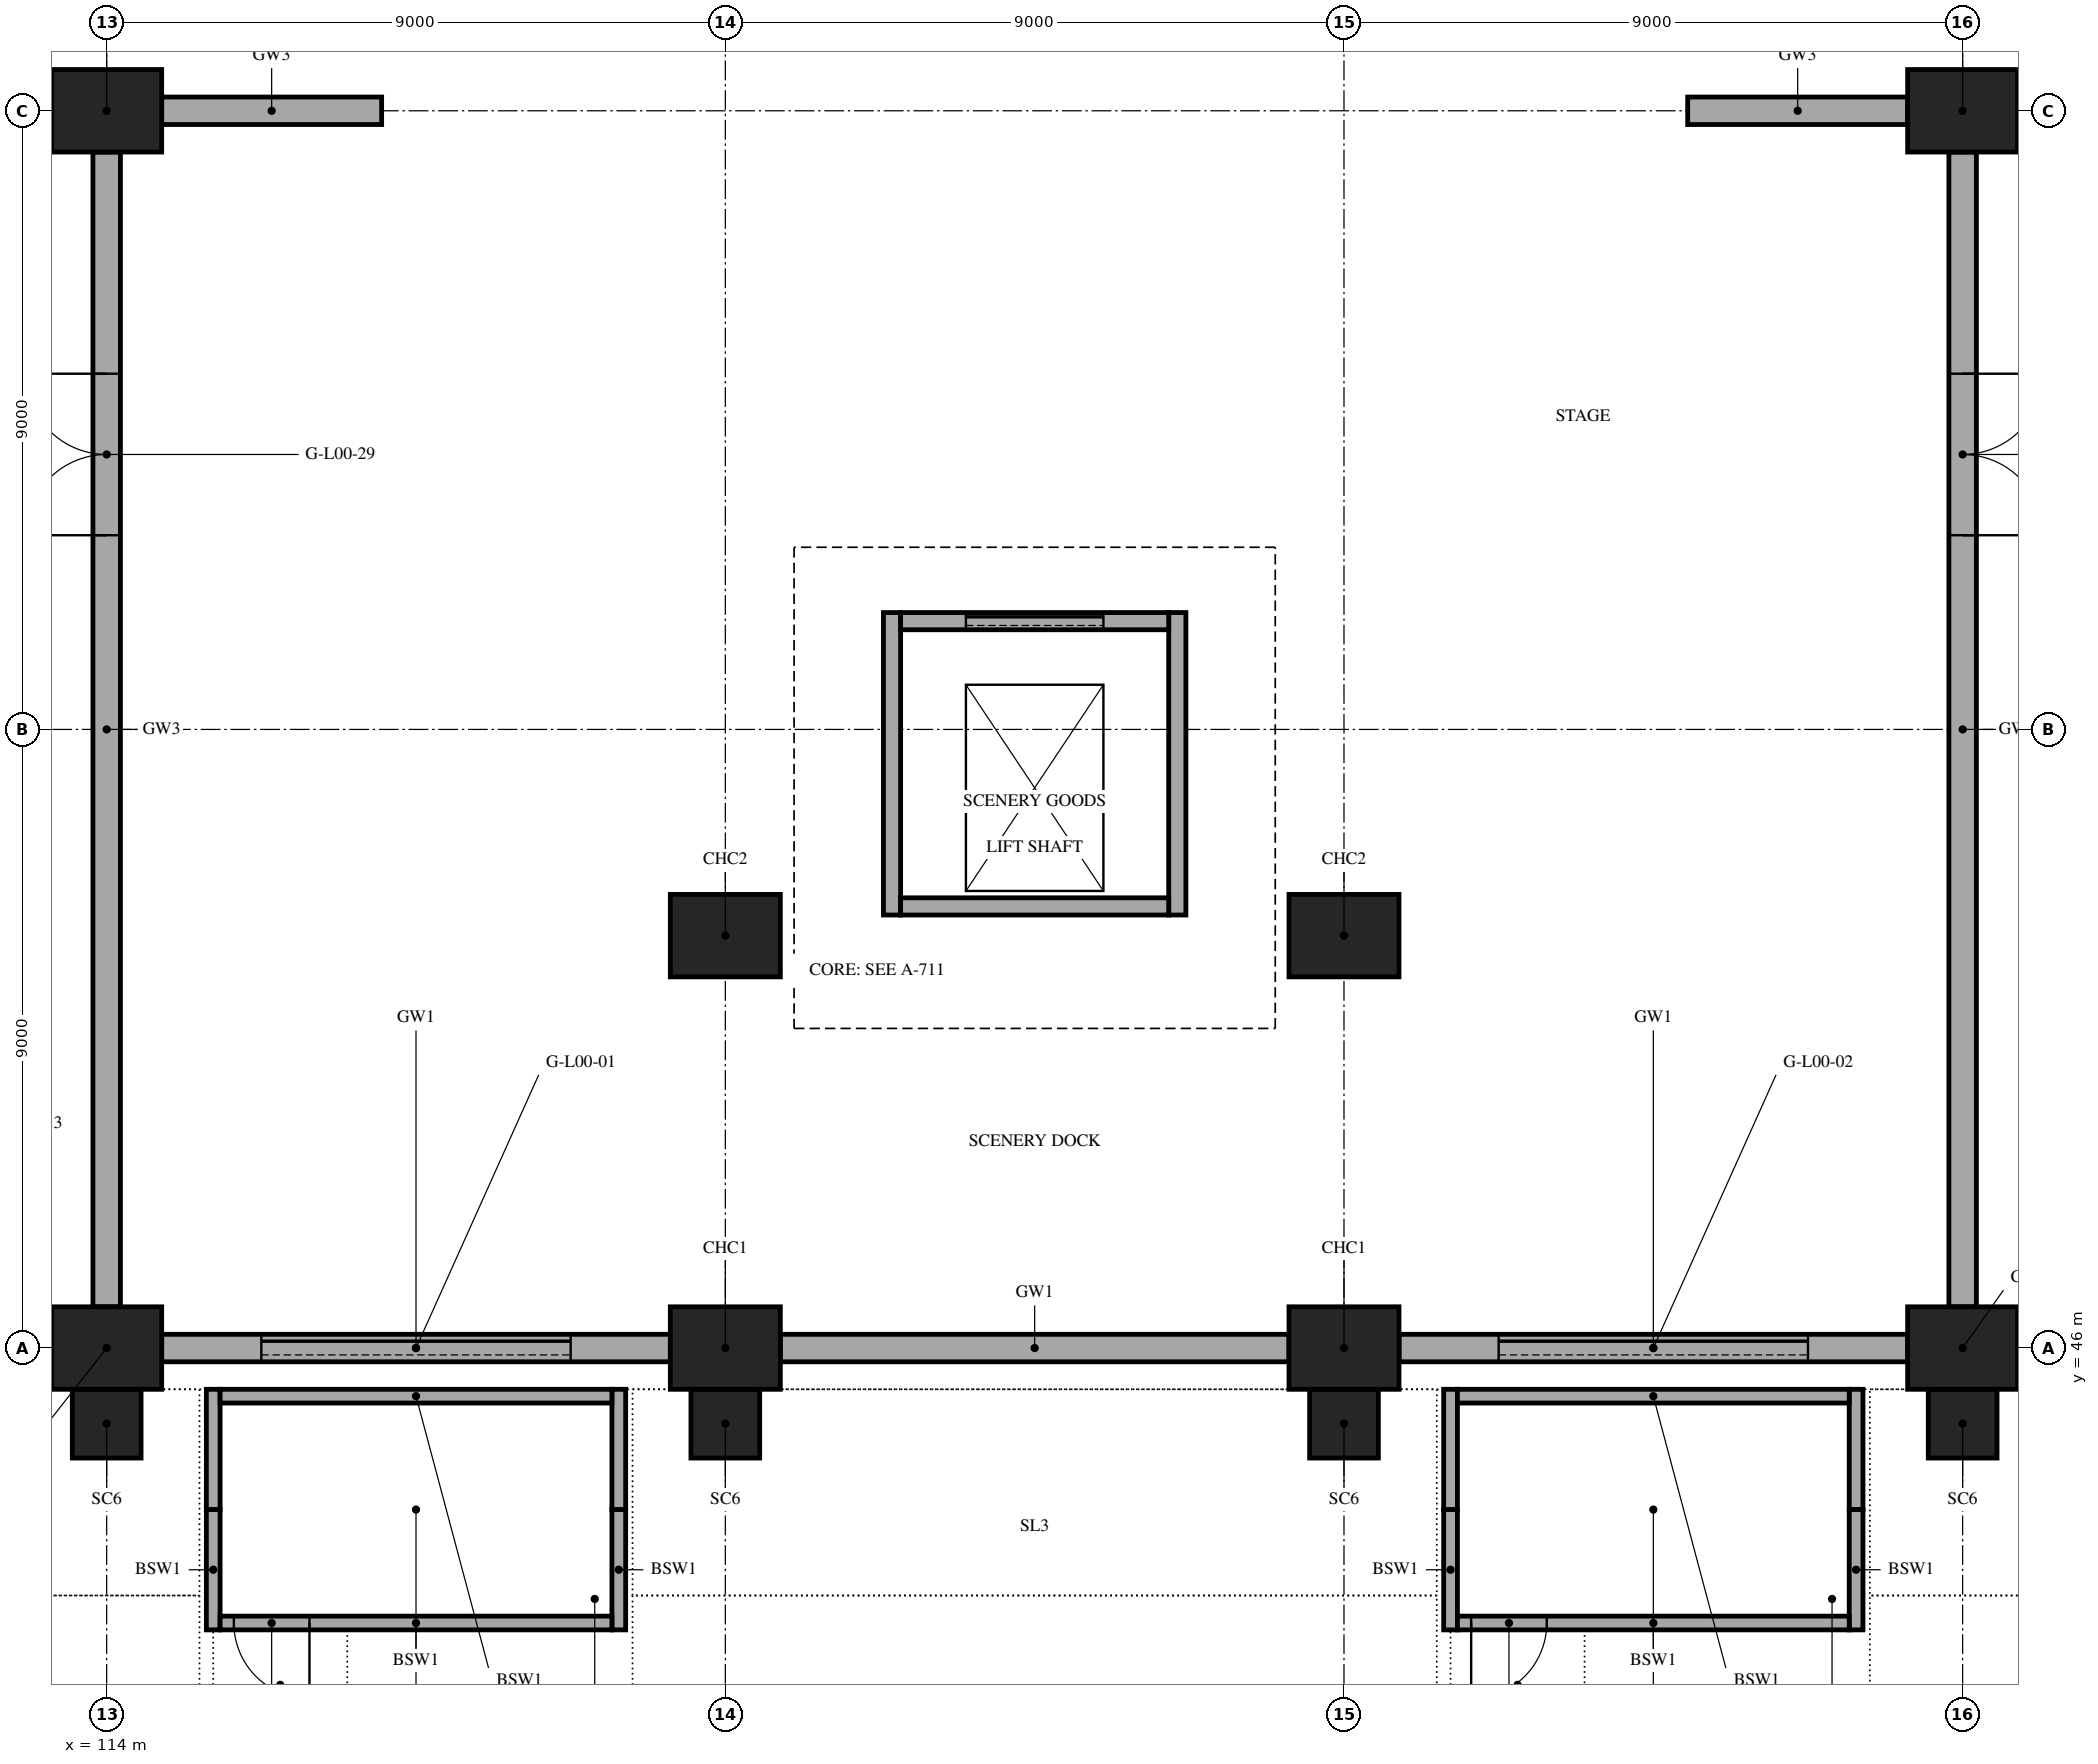
"""IFC4 building model, lengths in metres.
Left out: names, types, materials, properties, quantities, classifications, styles, units other than length and angle.
Written with IfcOpenShell. Run it as: python <this file> out.ifc"""

import sys

from ifc_helpers import new_model, si_unit, direction, frame, frame_2d, origin, origin_2d, place, context, subcontext, project, spatial, rectangle, extrude, element, fill, save


model = new_model("IFC4")
c1 = context("Model", 3, precision=1e-05, world=origin(), true_north=direction((0.0, 1.0)))
c2 = subcontext(c1, "Body", "Model", "MODEL_VIEW")
j1 = project(units=[si_unit("LENGTHUNIT", "METRE"), si_unit("PLANEANGLEUNIT", "RADIAN")], contexts=[c1])
p1 = place(None, origin())
s1 = spatial("IfcSite", under=j1, at=p1, CompositionType="ELEMENT")
p2 = place(p1, origin())
s2 = spatial("IfcBuilding", under=s1, at=p2, CompositionType="ELEMENT")
p3 = place(p2, origin())
s3 = spatial("IfcBuildingStorey", under=s2, at=p3, CompositionType="ELEMENT", Elevation=0.0)
for number, where, z_axis, x_axis in (
    (1, (114.0, 44.9, -0.3), (0.0, 0.0, 1.0), (1.0, 0.0, 0.0)),
    (2, (123.0, 44.9, -0.3), (0.0, 0.0, 1.0), (1.0, 0.0, 0.0)),
    (3, (132.0, 44.9, -0.3), (0.0, 0.0, 1.0), (1.0, 0.0, 0.0)),
    (4, (141.0, 44.9, -0.3), (0.0, 0.0, 1.0), (1.0, 0.0, 0.0)),
):
    element("IfcColumn", number, at=place(p3, frame(where, z_axis=z_axis, x_axis=x_axis)), inside=s3, PredefinedType="COLUMN", context=c2, shape_type="SweptSolid", body=[
        extrude(rectangle(XDim=1.0, YDim=1.0, at=origin_2d()), origin(), (0.0, 0.0, 1.0), 5.3),
    ])
for number, where, z_axis, x_axis in (
    (5, (114.0, 46.0, 0.0), (0.0, 0.0, 1.0), (1.0, 0.0, 0.0)),
    (6, (123.0, 46.0, 0.0), (0.0, 0.0, 1.0), (1.0, 0.0, 0.0)),
    (7, (132.0, 46.0, 0.0), (0.0, 0.0, 1.0), (1.0, 0.0, 0.0)),
    (8, (141.0, 46.0, 0.0), (0.0, 0.0, 1.0), (1.0, 0.0, 0.0)),
    (9, (123.0, 52.0, 0.0), (0.0, 0.0, 1.0), (1.0, 0.0, 0.0)),
    (10, (132.0, 52.0, 0.0), (0.0, 0.0, 1.0), (1.0, 0.0, 0.0)),
    (11, (114.0, 64.0, 0.0), (0.0, 0.0, 1.0), (1.0, 0.0, 0.0)),
    (12, (141.0, 64.0, 0.0), (0.0, 0.0, 1.0), (1.0, 0.0, 0.0)),
):
    element("IfcColumn", number, at=place(p3, frame(where, z_axis=z_axis, x_axis=x_axis)), inside=s3, PredefinedType="COLUMN", context=c2, shape_type="SweptSolid", body=[
        extrude(rectangle(XDim=1.6, YDim=1.2, at=origin_2d()), origin(), (0.0, 0.0, 1.0), 5.0),
    ])
p4 = place(p3, frame((114.0, 46.6, 0.0), z_axis=(0.0, 0.0, 1.0), x_axis=(0.0, 1.0, 0.0)))
e13 = element("IfcWall", 13, at=p4, inside=s3, PredefinedType="SHEAR", context=c2, shape_type="SweptSolid", body=[
    extrude(rectangle(XDim=16.8, YDim=0.4, at=frame_2d((8.4, 0.0))), origin(), (0.0, 0.0, 1.0), 5.0),
])
p5 = place(p4, frame((11.225, 0.0, 0.0)))
e14 = element("IfcOpeningElement", 14, at=p5, cuts=e13, PredefinedType="OPENING", context=c2, shape_type="SweptSolid", body=[
    extrude(rectangle(XDim=2.35, YDim=2.4, at=frame_2d((1.175, 1.2))), frame((0.0, 0.21, 0.0), z_axis=(0.0, -1.0, 0.0), x_axis=(1.0, 0.0, 0.0)), (0.0, 0.0, 1.0), 0.42),
])
p6 = place(p3, frame((141.0, 46.6, 0.0), z_axis=(0.0, 0.0, 1.0), x_axis=(0.0, 1.0, 0.0)))
e15 = element("IfcWall", 15, at=p6, inside=s3, PredefinedType="SHEAR", context=c2, shape_type="SweptSolid", body=[
    extrude(rectangle(XDim=16.8, YDim=0.4, at=frame_2d((8.4, 0.0))), origin(), (0.0, 0.0, 1.0), 5.0),
])
p7 = place(p6, frame((11.225, 0.0, 0.0)))
e16 = element("IfcOpeningElement", 16, at=p7, cuts=e15, PredefinedType="OPENING", context=c2, shape_type="SweptSolid", body=[
    extrude(rectangle(XDim=2.35, YDim=2.4, at=frame_2d((1.175, 1.2))), frame((0.0, 0.21, 0.0), z_axis=(0.0, -1.0, 0.0), x_axis=(1.0, 0.0, 0.0)), (0.0, 0.0, 1.0), 0.42),
])
for number, where, z_axis, x_axis in (
    (17, (114.8, 64.0, 0.0), (0.0, 0.0, 1.0), (1.0, 0.0, 0.0)),
    (18, (137.0, 64.0, 0.0), (0.0, 0.0, 1.0), (1.0, 0.0, 0.0)),
):
    element("IfcWall", number, at=place(p3, frame(where, z_axis=z_axis, x_axis=x_axis)), inside=s3, PredefinedType="SHEAR", context=c2, shape_type="SweptSolid", body=[
        extrude(rectangle(XDim=3.2, YDim=0.4, at=frame_2d((1.6, 0.0))), origin(), (0.0, 0.0, 1.0), 5.0),
    ])
for number, where, z_axis, x_axis in (
    (19, (125.425, 52.3, 0.0), (0.0, 0.0, 1.0), (0.0, 1.0, 0.0)),
    (20, (129.575, 52.3, 0.0), (0.0, 0.0, 1.0), (0.0, 1.0, 0.0)),
):
    element("IfcWall", number, at=place(p3, frame(where, z_axis=z_axis, x_axis=x_axis)), inside=s3, PredefinedType="SHEAR", context=c2, shape_type="SweptSolid", body=[
        extrude(rectangle(XDim=4.4, YDim=0.25, at=frame_2d((2.2, 0.0))), origin(), (0.0, 0.0, 1.0), 5.0),
    ])
p8 = place(p3, frame((125.55, 52.425, 0.0), z_axis=(0.0, 0.0, 1.0), x_axis=(1.0, 0.0, 0.0)))
e21 = element("IfcWall", 21, at=p8, inside=s3, PredefinedType="SHEAR", context=c2, shape_type="SweptSolid", body=[
    extrude(rectangle(XDim=3.9, YDim=0.25, at=frame_2d((1.95, 0.0))), origin(), (0.0, 0.0, 1.0), 5.0),
])
p9 = place(p3, frame((125.55, 56.575, 0.0), z_axis=(0.0, 0.0, 1.0), x_axis=(1.0, 0.0, 0.0)))
e22 = element("IfcWall", 22, at=p9, inside=s3, PredefinedType="SHEAR", context=c2, shape_type="SweptSolid", body=[
    extrude(rectangle(XDim=3.9, YDim=0.25, at=frame_2d((1.95, 0.0))), origin(), (0.0, 0.0, 1.0), 5.0),
])
p10 = place(p9, frame((0.95, 0.0, 0.0)))
e23 = element("IfcOpeningElement", 23, at=p10, cuts=e22, PredefinedType="OPENING", context=c2, shape_type="SweptSolid", body=[
    extrude(rectangle(XDim=2.0, YDim=2.4, at=frame_2d((1.0, 1.2))), frame((0.0, 0.135, 0.0), z_axis=(0.0, -1.0, 0.0), x_axis=(1.0, 0.0, 0.0)), (0.0, 0.0, 1.0), 0.27),
])
for number, where, z_axis, x_axis in (
    (24, (115.55, 45.4, 0.0), (0.0, 0.0, 1.0), (0.0, -1.0, 0.0)),
    (25, (115.55, 43.65, 0.0), (0.0, 0.0, 1.0), (0.0, -1.0, 0.0)),
    (26, (121.45, 45.4, 0.0), (0.0, 0.0, 1.0), (0.0, -1.0, 0.0)),
    (27, (121.45, 43.65, 0.0), (0.0, 0.0, 1.0), (0.0, -1.0, 0.0)),
):
    element("IfcWall", number, at=place(p3, frame(where, z_axis=z_axis, x_axis=x_axis)), inside=s3, PredefinedType="SOLIDWALL", context=c2, shape_type="SweptSolid", body=[
        extrude(rectangle(XDim=1.75, YDim=0.2, at=frame_2d((0.875, 0.0))), origin(), (0.0, 0.0, 1.0), 3.2),
    ])
p11 = place(p3, frame((115.65, 42.0, 0.0), z_axis=(0.0, 0.0, 1.0), x_axis=(1.0, 0.0, 0.0)))
e28 = element("IfcWall", 28, at=p11, inside=s3, PredefinedType="SOLIDWALL", context=c2, shape_type="SweptSolid", body=[
    extrude(rectangle(XDim=5.7, YDim=0.2, at=frame_2d((2.85, 0.0))), origin(), (0.0, 0.0, 1.0), 3.2),
])
p12 = place(p11, frame((0.2, 0.0, 0.0)))
e29 = element("IfcOpeningElement", 29, at=p12, cuts=e28, PredefinedType="OPENING", context=c2, shape_type="SweptSolid", body=[
    extrude(rectangle(XDim=1.1, YDim=2.1, at=frame_2d((0.55, 1.05))), frame((0.0, 0.11, 0.0), z_axis=(0.0, -1.0, 0.0), x_axis=(1.0, 0.0, 0.0)), (0.0, 0.0, 1.0), 0.22),
])
p13 = place(p3, frame((115.65, 45.3, 0.0), z_axis=(0.0, 0.0, 1.0), x_axis=(1.0, 0.0, 0.0)))
e30 = element("IfcWall", 30, at=p13, inside=s3, PredefinedType="SOLIDWALL", context=c2, shape_type="SweptSolid", body=[
    extrude(rectangle(XDim=5.7, YDim=0.2, at=frame_2d((2.85, 0.0))), origin(), (0.0, 0.0, 1.0), 3.2),
])
for number, where, z_axis, x_axis in (
    (31, (133.55, 45.4, 0.0), (0.0, 0.0, 1.0), (0.0, -1.0, 0.0)),
    (32, (133.55, 43.65, 0.0), (0.0, 0.0, 1.0), (0.0, -1.0, 0.0)),
    (33, (139.45, 45.4, 0.0), (0.0, 0.0, 1.0), (0.0, -1.0, 0.0)),
    (34, (139.45, 43.65, 0.0), (0.0, 0.0, 1.0), (0.0, -1.0, 0.0)),
):
    element("IfcWall", number, at=place(p3, frame(where, z_axis=z_axis, x_axis=x_axis)), inside=s3, PredefinedType="SOLIDWALL", context=c2, shape_type="SweptSolid", body=[
        extrude(rectangle(XDim=1.75, YDim=0.2, at=frame_2d((0.875, 0.0))), origin(), (0.0, 0.0, 1.0), 3.2),
    ])
p14 = place(p3, frame((133.65, 42.0, 0.0), z_axis=(0.0, 0.0, 1.0), x_axis=(1.0, 0.0, 0.0)))
e35 = element("IfcWall", 35, at=p14, inside=s3, PredefinedType="SOLIDWALL", context=c2, shape_type="SweptSolid", body=[
    extrude(rectangle(XDim=5.7, YDim=0.2, at=frame_2d((2.85, 0.0))), origin(), (0.0, 0.0, 1.0), 3.2),
])
p15 = place(p14, frame((0.2, 0.0, 0.0)))
e36 = element("IfcOpeningElement", 36, at=p15, cuts=e35, PredefinedType="OPENING", context=c2, shape_type="SweptSolid", body=[
    extrude(rectangle(XDim=1.1, YDim=2.1, at=frame_2d((0.55, 1.05))), frame((0.0, 0.11, 0.0), z_axis=(0.0, -1.0, 0.0), x_axis=(1.0, 0.0, 0.0)), (0.0, 0.0, 1.0), 0.22),
])
p16 = place(p3, frame((133.65, 45.3, 0.0), z_axis=(0.0, 0.0, 1.0), x_axis=(1.0, 0.0, 0.0)))
e37 = element("IfcWall", 37, at=p16, inside=s3, PredefinedType="SOLIDWALL", context=c2, shape_type="SweptSolid", body=[
    extrude(rectangle(XDim=5.7, YDim=0.2, at=frame_2d((2.85, 0.0))), origin(), (0.0, 0.0, 1.0), 3.2),
])
p17 = place(p3, frame((114.8, 46.0, 0.0), z_axis=(0.0, 0.0, 1.0), x_axis=(1.0, 0.0, 0.0)))
e38 = element("IfcWall", 38, at=p17, inside=s3, PredefinedType="SOLIDWALL", context=c2, shape_type="SweptSolid", body=[
    extrude(rectangle(XDim=7.4, YDim=0.4, at=frame_2d((3.7, 0.0))), origin(), (0.0, 0.0, 1.0), 4.4),
])
p18 = place(p17, frame((1.45, 0.0, 0.0)))
e39 = element("IfcOpeningElement", 39, at=p18, cuts=e38, PredefinedType="OPENING", context=c2, shape_type="SweptSolid", body=[
    extrude(rectangle(XDim=4.5, YDim=4.3, at=frame_2d((2.25, 2.15))), frame((0.0, 0.21, 0.0), z_axis=(0.0, -1.0, 0.0), x_axis=(1.0, 0.0, 0.0)), (0.0, 0.0, 1.0), 0.42),
])
p19 = place(p3, frame((123.8, 46.0, 0.0), z_axis=(0.0, 0.0, 1.0), x_axis=(1.0, 0.0, 0.0)))
e40 = element("IfcWall", 40, at=p19, inside=s3, PredefinedType="SOLIDWALL", context=c2, shape_type="SweptSolid", body=[
    extrude(rectangle(XDim=7.4, YDim=0.4, at=frame_2d((3.7, 0.0))), origin(), (0.0, 0.0, 1.0), 5.0),
])
p20 = place(p3, frame((132.8, 46.0, 0.0), z_axis=(0.0, 0.0, 1.0), x_axis=(1.0, 0.0, 0.0)))
e41 = element("IfcWall", 41, at=p20, inside=s3, PredefinedType="SOLIDWALL", context=c2, shape_type="SweptSolid", body=[
    extrude(rectangle(XDim=7.4, YDim=0.4, at=frame_2d((3.7, 0.0))), origin(), (0.0, 0.0, 1.0), 4.4),
])
p21 = place(p20, frame((1.45, 0.0, 0.0)))
e42 = element("IfcOpeningElement", 42, at=p21, cuts=e41, PredefinedType="OPENING", context=c2, shape_type="SweptSolid", body=[
    extrude(rectangle(XDim=4.5, YDim=4.3, at=frame_2d((2.25, 2.15))), frame((0.0, 0.21, 0.0), z_axis=(0.0, -1.0, 0.0), x_axis=(1.0, 0.0, 0.0)), (0.0, 0.0, 1.0), 0.42),
])
p22 = place(p12, frame((1.1, 0.0, 0.0), z_axis=(0.0, 0.0, 1.0), x_axis=(-1.0, 0.0, 0.0)))
e43 = element("IfcDoor", 43, at=p22, inside=s3, OperationType="SINGLE_SWING_LEFT", PredefinedType="DOOR", context=c2, shape_type="SweptSolid", body=[
    extrude(rectangle(XDim=1.1, YDim=2.1, at=frame_2d((0.55, 1.05))), frame((0.0, 0.025, 0.0), z_axis=(0.0, -1.0, 0.0), x_axis=(1.0, 0.0, 0.0)), (0.0, 0.0, 1.0), 0.05),
])
fill(e29, e43)
p23 = place(p15, frame((1.1, 0.0, 0.0), z_axis=(0.0, 0.0, 1.0), x_axis=(-1.0, 0.0, 0.0)))
e44 = element("IfcDoor", 44, at=p23, inside=s3, OperationType="SINGLE_SWING_RIGHT", PredefinedType="DOOR", context=c2, shape_type="SweptSolid", body=[
    extrude(rectangle(XDim=1.1, YDim=2.1, at=frame_2d((0.55, 1.05))), frame((0.0, 0.025, 0.0), z_axis=(0.0, -1.0, 0.0), x_axis=(1.0, 0.0, 0.0)), (0.0, 0.0, 1.0), 0.05),
])
fill(e36, e44)
p24 = place(p18, frame((4.5, 0.0, 0.0), z_axis=(0.0, 0.0, 1.0), x_axis=(-1.0, 0.0, 0.0)))
e45 = element("IfcDoor", 45, at=p24, inside=s3, OperationType="ROLLINGUP", PredefinedType="DOOR", context=c2, shape_type="SweptSolid", body=[
    extrude(rectangle(XDim=4.5, YDim=4.3, at=frame_2d((2.25, 2.15))), frame((0.0, 0.025, 0.0), z_axis=(0.0, -1.0, 0.0), x_axis=(1.0, 0.0, 0.0)), (0.0, 0.0, 1.0), 0.05),
])
fill(e39, e45)
p25 = place(p21, frame((4.5, 0.0, 0.0), z_axis=(0.0, 0.0, 1.0), x_axis=(-1.0, 0.0, 0.0)))
e46 = element("IfcDoor", 46, at=p25, inside=s3, OperationType="ROLLINGUP", PredefinedType="DOOR", context=c2, shape_type="SweptSolid", body=[
    extrude(rectangle(XDim=4.5, YDim=4.3, at=frame_2d((2.25, 2.15))), frame((0.0, 0.025, 0.0), z_axis=(0.0, -1.0, 0.0), x_axis=(1.0, 0.0, 0.0)), (0.0, 0.0, 1.0), 0.05),
])
fill(e42, e46)
p26 = place(p10, origin())
e47 = element("IfcDoor", 47, at=p26, inside=s3, OperationType="SLIDING_TO_LEFT", PredefinedType="DOOR", context=c2, shape_type="SweptSolid", body=[
    extrude(rectangle(XDim=2.0, YDim=2.4, at=frame_2d((1.0, 1.2))), frame((0.0, 0.025, 0.0), z_axis=(0.0, -1.0, 0.0), x_axis=(1.0, 0.0, 0.0)), (0.0, 0.0, 1.0), 0.05),
])
fill(e23, e47)
p27 = place(p5, origin())
e48 = element("IfcDoor", 48, at=p27, inside=s3, OperationType="DOUBLE_DOOR_SINGLE_SWING", PredefinedType="DOOR", context=c2, shape_type="SweptSolid", body=[
    extrude(rectangle(XDim=2.35, YDim=2.4, at=frame_2d((1.175, 1.2))), frame((0.0, 0.025, 0.0), z_axis=(0.0, -1.0, 0.0), x_axis=(1.0, 0.0, 0.0)), (0.0, 0.0, 1.0), 0.05),
])
fill(e14, e48)
p28 = place(p7, frame((2.35, 0.0, 0.0), z_axis=(0.0, 0.0, 1.0), x_axis=(-1.0, 0.0, 0.0)))
e49 = element("IfcDoor", 49, at=p28, inside=s3, OperationType="DOUBLE_DOOR_SINGLE_SWING", PredefinedType="DOOR", context=c2, shape_type="SweptSolid", body=[
    extrude(rectangle(XDim=2.35, YDim=2.4, at=frame_2d((1.175, 1.2))), frame((0.0, 0.025, 0.0), z_axis=(0.0, -1.0, 0.0), x_axis=(1.0, 0.0, 0.0)), (0.0, 0.0, 1.0), 0.05),
])
fill(e16, e49)
save(model, sys.argv[1])
